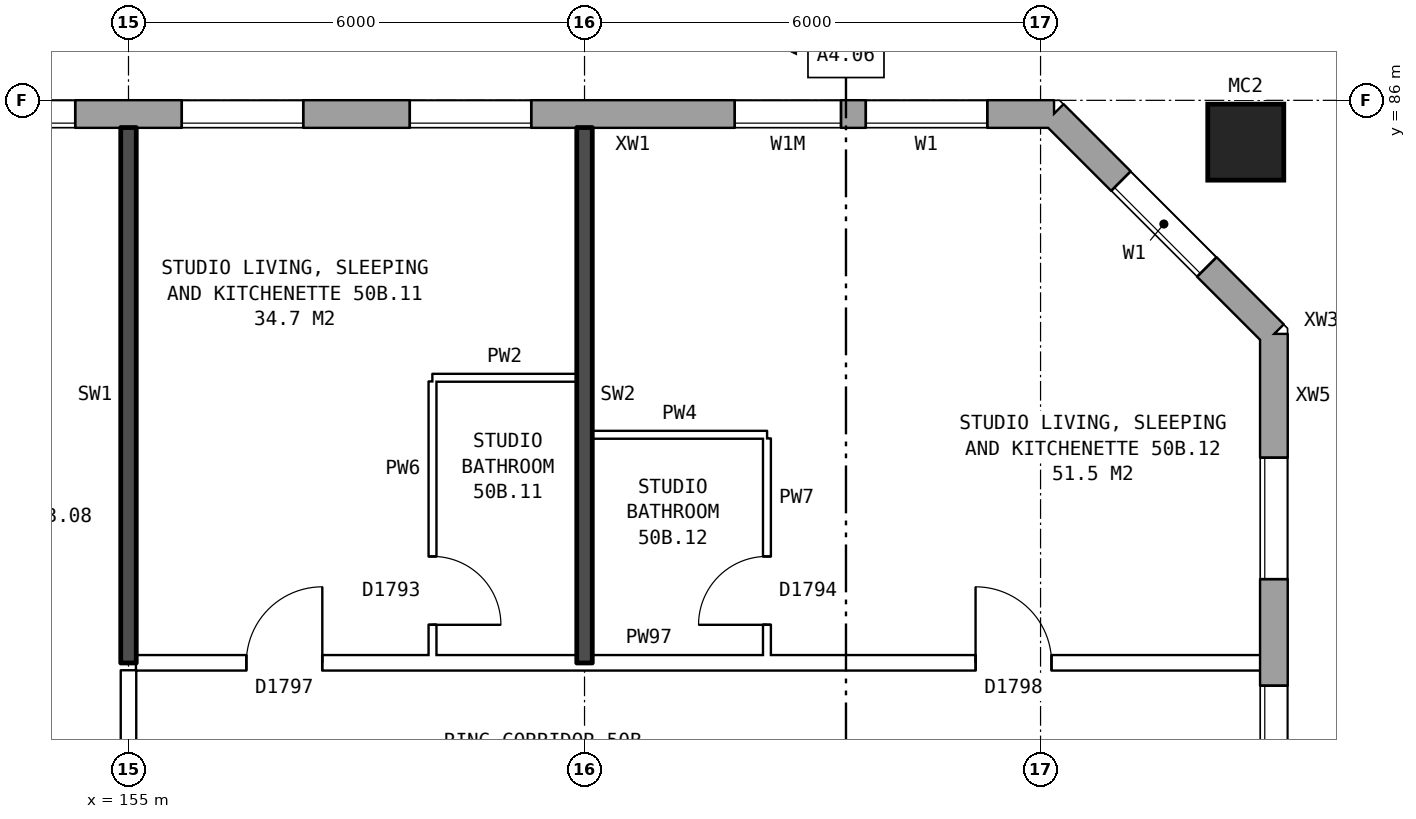
"""IFC4 building model, lengths in metres.
Left out: names, types, materials, properties, quantities, classifications, styles, units other than length and angle.
Written with IfcOpenShell. Run it as: python <this file> out.ifc"""

import sys

from ifc_helpers import new_model, si_unit, direction, frame, frame_2d, origin, origin_2d, place, context, subcontext, project, spatial, rectangle, hollow_rectangle, extrude, element, fill, save


model = new_model("IFC4")
c1 = context("Model", 3, precision=1e-05, world=origin(), true_north=direction((0.0, 1.0)))
c2 = subcontext(c1, "Body", "Model", "MODEL_VIEW")
j1 = project(units=[si_unit("LENGTHUNIT", "METRE"), si_unit("PLANEANGLEUNIT", "RADIAN")], contexts=[c1])
p1 = place(None, origin())
s1 = spatial("IfcSite", under=j1, at=p1, CompositionType="ELEMENT")
p2 = place(p1, origin())
s2 = spatial("IfcBuilding", under=s1, at=p2, CompositionType="ELEMENT")
p3 = place(p2, frame((0.0, 0.0, 178.9)))
s3 = spatial("IfcBuildingStorey", under=s2, at=p3, CompositionType="ELEMENT", Elevation=178.9)
p4 = place(p3, frame((169.7, 85.45, 0.0), z_axis=(0.0, 0.0, 1.0), x_axis=(1.0, 0.0, 0.0)))
e1 = element("IfcColumn", 1, at=p4, inside=s3, PredefinedType="COLUMN", context=c2, shape_type="SweptSolid", body=[
    extrude(hollow_rectangle(XDim=1.0, YDim=1.0, WallThickness=0.055, at=origin_2d()), origin(), (0.0, 0.0, 1.0), 3.1),
])
p5 = place(p3, frame((170.07, 57.075, 0.0), z_axis=(0.0, 0.0, 1.0), x_axis=(0.0, 1.0, 0.0)))
e2 = element("IfcWall", 2, at=p5, inside=s3, PredefinedType="STANDARD", context=c2, shape_type="SweptSolid", body=[
    extrude(rectangle(XDim=25.851, YDim=0.36, at=frame_2d((12.925, 0.0))), origin(), (0.0, 0.0, 1.0), 2.85),
])
p6 = place(p5, frame((1.625, 0.0, 0.8)))
e3 = element("IfcOpeningElement", 3, at=p6, cuts=e2, PredefinedType="OPENING", context=c2, shape_type="SweptSolid", body=[
    extrude(rectangle(XDim=1.6, YDim=1.8, at=frame_2d((0.8, 0.9))), frame((0.0, 0.19, 0.0), z_axis=(0.0, -1.0, 0.0), x_axis=(1.0, 0.0, 0.0)), (0.0, 0.0, 1.0), 0.38),
])
p7 = place(p5, frame((4.625, 0.0, 0.8)))
e4 = element("IfcOpeningElement", 4, at=p7, cuts=e2, PredefinedType="OPENING", context=c2, shape_type="SweptSolid", body=[
    extrude(rectangle(XDim=1.6, YDim=1.8, at=frame_2d((0.8, 0.9))), frame((0.0, 0.19, 0.0), z_axis=(0.0, -1.0, 0.0), x_axis=(1.0, 0.0, 0.0)), (0.0, 0.0, 1.0), 0.38),
])
p8 = place(p5, frame((6.525, 0.0, 0.8)))
e5 = element("IfcOpeningElement", 5, at=p8, cuts=e2, PredefinedType="OPENING", context=c2, shape_type="SweptSolid", body=[
    extrude(rectangle(XDim=1.4, YDim=1.8, at=frame_2d((0.7, 0.9))), frame((0.0, 0.19, 0.0), z_axis=(0.0, -1.0, 0.0), x_axis=(1.0, 0.0, 0.0)), (0.0, 0.0, 1.0), 0.38),
])
p9 = place(p5, frame((8.225, 0.0, 1.6)))
e6 = element("IfcOpeningElement", 6, at=p9, cuts=e2, PredefinedType="OPENING", context=c2, shape_type="SweptSolid", body=[
    extrude(rectangle(XDim=0.8, YDim=0.9, at=frame_2d((0.4, 0.45))), frame((0.0, 0.19, 0.0), z_axis=(0.0, -1.0, 0.0), x_axis=(1.0, 0.0, 0.0)), (0.0, 0.0, 1.0), 0.38),
])
p10 = place(p5, frame((10.075, 0.0, 0.8)))
e7 = element("IfcOpeningElement", 7, at=p10, cuts=e2, PredefinedType="OPENING", context=c2, shape_type="SweptSolid", body=[
    extrude(rectangle(XDim=1.0, YDim=0.9, at=frame_2d((0.5, 0.45))), frame((0.0, 0.19, 0.0), z_axis=(0.0, -1.0, 0.0), x_axis=(1.0, 0.0, 0.0)), (0.0, 0.0, 1.0), 0.38),
])
p11 = place(p5, frame((11.375, 0.0, 0.8)))
e8 = element("IfcOpeningElement", 8, at=p11, cuts=e2, PredefinedType="OPENING", context=c2, shape_type="SweptSolid", body=[
    extrude(rectangle(XDim=1.2, YDim=1.8, at=frame_2d((0.6, 0.9))), frame((0.0, 0.19, 0.0), z_axis=(0.0, -1.0, 0.0), x_axis=(1.0, 0.0, 0.0)), (0.0, 0.0, 1.0), 0.38),
])
p12 = place(p5, frame((19.625, 0.0, 0.8)))
e9 = element("IfcOpeningElement", 9, at=p12, cuts=e2, PredefinedType="OPENING", context=c2, shape_type="SweptSolid", body=[
    extrude(rectangle(XDim=1.6, YDim=1.8, at=frame_2d((0.8, 0.9))), frame((0.0, 0.19, 0.0), z_axis=(0.0, -1.0, 0.0), x_axis=(1.0, 0.0, 0.0)), (0.0, 0.0, 1.0), 0.38),
])
p13 = place(p5, frame((22.625, 0.0, 0.8)))
e10 = element("IfcOpeningElement", 10, at=p13, cuts=e2, PredefinedType="OPENING", context=c2, shape_type="SweptSolid", body=[
    extrude(rectangle(XDim=1.6, YDim=1.8, at=frame_2d((0.8, 0.9))), frame((0.0, 0.19, 0.0), z_axis=(0.0, -1.0, 0.0), x_axis=(1.0, 0.0, 0.0)), (0.0, 0.0, 1.0), 0.38),
])
p14 = place(p5, frame((12.875, 0.0, 0.8)))
e11 = element("IfcOpeningElement", 11, at=p14, cuts=e2, PredefinedType="OPENING", context=c2, shape_type="SweptSolid", body=[
    extrude(rectangle(XDim=1.6, YDim=1.8, at=frame_2d((0.8, 0.9))), frame((0.0, 0.19, 0.0), z_axis=(0.0, -1.0, 0.0), x_axis=(1.0, 0.0, 0.0)), (0.0, 0.0, 1.0), 0.38),
])
p15 = place(p5, frame((14.775, 0.0, 0.8)))
e12 = element("IfcOpeningElement", 12, at=p15, cuts=e2, PredefinedType="OPENING", context=c2, shape_type="SweptSolid", body=[
    extrude(rectangle(XDim=1.0, YDim=0.9, at=frame_2d((0.5, 0.45))), frame((0.0, 0.19, 0.0), z_axis=(0.0, -1.0, 0.0), x_axis=(1.0, 0.0, 0.0)), (0.0, 0.0, 1.0), 0.38),
])
p16 = place(p5, frame((16.675, 0.0, 1.7)))
e13 = element("IfcOpeningElement", 13, at=p16, cuts=e2, PredefinedType="OPENING", context=c2, shape_type="SweptSolid", body=[
    extrude(rectangle(XDim=0.8, YDim=0.9, at=frame_2d((0.4, 0.45))), frame((0.0, 0.19, 0.0), z_axis=(0.0, -1.0, 0.0), x_axis=(1.0, 0.0, 0.0)), (0.0, 0.0, 1.0), 0.38),
])
p17 = place(p5, frame((17.925, 0.0, 0.8)))
e14 = element("IfcOpeningElement", 14, at=p17, cuts=e2, PredefinedType="OPENING", context=c2, shape_type="SweptSolid", body=[
    extrude(rectangle(XDim=1.4, YDim=1.8, at=frame_2d((0.7, 0.9))), frame((0.0, 0.19, 0.0), z_axis=(0.0, -1.0, 0.0), x_axis=(1.0, 0.0, 0.0)), (0.0, 0.0, 1.0), 0.38),
])
p18 = place(p3, frame((170.07, 82.925, 0.0), z_axis=(0.0, 0.0, 1.0), x_axis=(-0.707106781187, 0.707106781187, 0.0)))
e15 = element("IfcWall", 15, at=p18, inside=s3, PredefinedType="STANDARD", context=c2, shape_type="SweptSolid", body=[
    extrude(rectangle(XDim=4.094, YDim=0.36, at=frame_2d((2.047, 0.0))), origin(), (0.0, 0.0, 1.0), 2.85),
])
p19 = place(p18, frame((1.247, 0.0, 0.8)))
e16 = element("IfcOpeningElement", 16, at=p19, cuts=e15, PredefinedType="OPENING", context=c2, shape_type="SweptSolid", body=[
    extrude(rectangle(XDim=1.6, YDim=1.8, at=frame_2d((0.8, 0.9))), frame((0.0, 0.19, 0.0), z_axis=(0.0, -1.0, 0.0), x_axis=(1.0, 0.0, 0.0)), (0.0, 0.0, 1.0), 0.38),
])
p20 = place(p3, frame((167.175, 85.82, 0.0), z_axis=(0.0, 0.0, 1.0), x_axis=(-1.0, 0.0, 0.0)))
e17 = element("IfcWall", 17, at=p20, inside=s3, PredefinedType="STANDARD", context=c2, shape_type="SweptSolid", body=[
    extrude(rectangle(XDim=33.101, YDim=0.36, at=frame_2d((16.55, 0.0))), origin(), (0.0, 0.0, 1.0), 2.85),
])
p21 = place(p20, frame((0.875, 0.0, 0.8)))
e18 = element("IfcOpeningElement", 18, at=p21, cuts=e17, PredefinedType="OPENING", context=c2, shape_type="SweptSolid", body=[
    extrude(rectangle(XDim=1.6, YDim=1.8, at=frame_2d((0.8, 0.9))), frame((0.0, 0.19, 0.0), z_axis=(0.0, -1.0, 0.0), x_axis=(1.0, 0.0, 0.0)), (0.0, 0.0, 1.0), 0.38),
])
p22 = place(p20, frame((2.8, 0.0, 1.4)))
e19 = element("IfcOpeningElement", 19, at=p22, cuts=e17, PredefinedType="OPENING", context=c2, shape_type="SweptSolid", body=[
    extrude(rectangle(XDim=1.4, YDim=1.2, at=frame_2d((0.7, 0.6))), frame((0.0, 0.19, 0.0), z_axis=(0.0, -1.0, 0.0), x_axis=(1.0, 0.0, 0.0)), (0.0, 0.0, 1.0), 0.38),
])
p23 = place(p20, frame((6.875, 0.0, 0.8)))
e20 = element("IfcOpeningElement", 20, at=p23, cuts=e17, PredefinedType="OPENING", context=c2, shape_type="SweptSolid", body=[
    extrude(rectangle(XDim=1.6, YDim=1.8, at=frame_2d((0.8, 0.9))), frame((0.0, 0.19, 0.0), z_axis=(0.0, -1.0, 0.0), x_axis=(1.0, 0.0, 0.0)), (0.0, 0.0, 1.0), 0.38),
])
p24 = place(p20, frame((9.875, 0.0, 0.8)))
e21 = element("IfcOpeningElement", 21, at=p24, cuts=e17, PredefinedType="OPENING", context=c2, shape_type="SweptSolid", body=[
    extrude(rectangle(XDim=1.6, YDim=1.8, at=frame_2d((0.8, 0.9))), frame((0.0, 0.19, 0.0), z_axis=(0.0, -1.0, 0.0), x_axis=(1.0, 0.0, 0.0)), (0.0, 0.0, 1.0), 0.38),
])
p25 = place(p20, frame((12.875, 0.0, 0.8)))
e22 = element("IfcOpeningElement", 22, at=p25, cuts=e17, PredefinedType="OPENING", context=c2, shape_type="SweptSolid", body=[
    extrude(rectangle(XDim=1.6, YDim=1.8, at=frame_2d((0.8, 0.9))), frame((0.0, 0.19, 0.0), z_axis=(0.0, -1.0, 0.0), x_axis=(1.0, 0.0, 0.0)), (0.0, 0.0, 1.0), 0.38),
])
p26 = place(p20, frame((15.875, 0.0, 0.8)))
e23 = element("IfcOpeningElement", 23, at=p26, cuts=e17, PredefinedType="OPENING", context=c2, shape_type="SweptSolid", body=[
    extrude(rectangle(XDim=1.6, YDim=1.8, at=frame_2d((0.8, 0.9))), frame((0.0, 0.19, 0.0), z_axis=(0.0, -1.0, 0.0), x_axis=(1.0, 0.0, 0.0)), (0.0, 0.0, 1.0), 0.38),
])
p27 = place(p20, frame((18.875, 0.0, 0.8)))
e24 = element("IfcOpeningElement", 24, at=p27, cuts=e17, PredefinedType="OPENING", context=c2, shape_type="SweptSolid", body=[
    extrude(rectangle(XDim=1.6, YDim=1.8, at=frame_2d((0.8, 0.9))), frame((0.0, 0.19, 0.0), z_axis=(0.0, -1.0, 0.0), x_axis=(1.0, 0.0, 0.0)), (0.0, 0.0, 1.0), 0.38),
])
p28 = place(p20, frame((21.875, 0.0, 0.8)))
e25 = element("IfcOpeningElement", 25, at=p28, cuts=e17, PredefinedType="OPENING", context=c2, shape_type="SweptSolid", body=[
    extrude(rectangle(XDim=1.6, YDim=1.8, at=frame_2d((0.8, 0.9))), frame((0.0, 0.19, 0.0), z_axis=(0.0, -1.0, 0.0), x_axis=(1.0, 0.0, 0.0)), (0.0, 0.0, 1.0), 0.38),
])
p29 = place(p20, frame((24.875, 0.0, 0.8)))
e26 = element("IfcOpeningElement", 26, at=p29, cuts=e17, PredefinedType="OPENING", context=c2, shape_type="SweptSolid", body=[
    extrude(rectangle(XDim=1.6, YDim=1.8, at=frame_2d((0.8, 0.9))), frame((0.0, 0.19, 0.0), z_axis=(0.0, -1.0, 0.0), x_axis=(1.0, 0.0, 0.0)), (0.0, 0.0, 1.0), 0.38),
])
p30 = place(p20, frame((26.775, 0.0, 0.8)))
e27 = element("IfcOpeningElement", 27, at=p30, cuts=e17, PredefinedType="OPENING", context=c2, shape_type="SweptSolid", body=[
    extrude(rectangle(XDim=0.8, YDim=0.9, at=frame_2d((0.4, 0.45))), frame((0.0, 0.19, 0.0), z_axis=(0.0, -1.0, 0.0), x_axis=(1.0, 0.0, 0.0)), (0.0, 0.0, 1.0), 0.38),
])
p31 = place(p20, frame((30.875, 0.0, 0.8)))
e28 = element("IfcOpeningElement", 28, at=p31, cuts=e17, PredefinedType="OPENING", context=c2, shape_type="SweptSolid", body=[
    extrude(rectangle(XDim=1.6, YDim=1.8, at=frame_2d((0.8, 0.9))), frame((0.0, 0.19, 0.0), z_axis=(0.0, -1.0, 0.0), x_axis=(1.0, 0.0, 0.0)), (0.0, 0.0, 1.0), 0.38),
])
p32 = place(p20, frame((28.925, 0.0, 1.4)))
e29 = element("IfcOpeningElement", 29, at=p32, cuts=e17, PredefinedType="OPENING", context=c2, shape_type="SweptSolid", body=[
    extrude(rectangle(XDim=1.0, YDim=1.2, at=frame_2d((0.5, 0.6))), frame((0.0, 0.19, 0.0), z_axis=(0.0, -1.0, 0.0), x_axis=(1.0, 0.0, 0.0)), (0.0, 0.0, 1.0), 0.38),
])
p33 = place(p3, frame((155.1, 78.6, 0.0), z_axis=(0.0, 0.0, 1.0), x_axis=(1.0, 0.0, 0.0)))
e30 = element("IfcWall", 30, at=p33, inside=s3, PredefinedType="PARTITIONING", context=c2, shape_type="SweptSolid", body=[
    extrude(rectangle(XDim=14.79, YDim=0.2, at=frame_2d((7.395, 0.0))), origin(), (0.0, 0.0, 1.0), 2.85),
])
p34 = place(p33, frame((1.45, 0.0, 0.0)))
e31 = element("IfcOpeningElement", 31, at=p34, cuts=e30, PredefinedType="OPENING", context=c2, shape_type="SweptSolid", body=[
    extrude(rectangle(XDim=1.0, YDim=2.1, at=frame_2d((0.5, 1.05))), frame((0.0, 0.11, 0.0), z_axis=(0.0, -1.0, 0.0), x_axis=(1.0, 0.0, 0.0)), (0.0, 0.0, 1.0), 0.22),
])
p35 = place(p33, frame((11.045, 0.0, 0.0)))
e32 = element("IfcOpeningElement", 32, at=p35, cuts=e30, PredefinedType="OPENING", context=c2, shape_type="SweptSolid", body=[
    extrude(rectangle(XDim=1.0, YDim=2.1, at=frame_2d((0.5, 1.05))), frame((0.0, 0.11, 0.0), z_axis=(0.0, -1.0, 0.0), x_axis=(1.0, 0.0, 0.0)), (0.0, 0.0, 1.0), 0.22),
])
p36 = place(p3, frame((161.1, 81.6, 0.0), z_axis=(0.0, 0.0, 1.0), x_axis=(1.0, 0.0, 0.0)))
e33 = element("IfcWall", 33, at=p36, inside=s3, PredefinedType="PARTITIONING", context=c2, shape_type="SweptSolid", body=[
    extrude(rectangle(XDim=2.3, YDim=0.1, at=frame_2d((1.15, 0.0))), origin(), (0.0, 0.0, 1.0), 2.85),
])
p37 = place(p3, frame((159.0, 82.35, 0.0), z_axis=(0.0, 0.0, 1.0), x_axis=(1.0, 0.0, 0.0)))
e34 = element("IfcWall", 34, at=p37, inside=s3, PredefinedType="PARTITIONING", context=c2, shape_type="SweptSolid", body=[
    extrude(rectangle(XDim=1.9, YDim=0.1, at=frame_2d((0.95, 0.0))), origin(), (0.0, 0.0, 1.0), 2.85),
])
p38 = place(p3, frame((155.0, 76.3, 0.0), z_axis=(0.0, 0.0, 1.0), x_axis=(0.0, 1.0, 0.0)))
e35 = element("IfcWall", 35, at=p38, inside=s3, PredefinedType="PARTITIONING", context=c2, shape_type="SweptSolid", body=[
    extrude(rectangle(XDim=2.2, YDim=0.2, at=frame_2d((1.1, 0.0))), origin(), (0.0, 0.0, 1.0), 2.85),
])
p39 = place(p3, frame((155.0, 78.6, 0.0), z_axis=(0.0, 0.0, 1.0), x_axis=(0.0, 1.0, 0.0)))
e36 = element("IfcWall", 36, at=p39, inside=s3, PredefinedType="SOLIDWALL", context=c2, shape_type="SweptSolid", body=[
    extrude(rectangle(XDim=7.04, YDim=0.2, at=frame_2d((3.52, 0.0))), origin(), (0.0, 0.0, 1.0), 2.85),
])
p40 = place(p3, frame((159.0, 78.7, 0.0), z_axis=(0.0, 0.0, 1.0), x_axis=(0.0, 1.0, 0.0)))
e37 = element("IfcWall", 37, at=p40, inside=s3, PredefinedType="PARTITIONING", context=c2, shape_type="SweptSolid", body=[
    extrude(rectangle(XDim=3.6, YDim=0.1, at=frame_2d((1.8, 0.0))), origin(), (0.0, 0.0, 1.0), 2.85),
])
p41 = place(p40, frame((0.4, 0.0, 0.0)))
e38 = element("IfcOpeningElement", 38, at=p41, cuts=e37, PredefinedType="OPENING", context=c2, shape_type="SweptSolid", body=[
    extrude(rectangle(XDim=0.9, YDim=2.1, at=frame_2d((0.45, 1.05))), frame((0.0, 0.06, 0.0), z_axis=(0.0, -1.0, 0.0), x_axis=(1.0, 0.0, 0.0)), (0.0, 0.0, 1.0), 0.12),
])
p42 = place(p3, frame((161.0, 78.6, 0.0), z_axis=(0.0, 0.0, 1.0), x_axis=(0.0, 1.0, 0.0)))
e39 = element("IfcWall", 39, at=p42, inside=s3, PredefinedType="SOLIDWALL", context=c2, shape_type="SweptSolid", body=[
    extrude(rectangle(XDim=7.04, YDim=0.2, at=frame_2d((3.52, 0.0))), origin(), (0.0, 0.0, 1.0), 2.85),
])
p43 = place(p3, frame((163.4, 78.7, 0.0), z_axis=(0.0, 0.0, 1.0), x_axis=(0.0, 1.0, 0.0)))
e40 = element("IfcWall", 40, at=p43, inside=s3, PredefinedType="PARTITIONING", context=c2, shape_type="SweptSolid", body=[
    extrude(rectangle(XDim=2.85, YDim=0.1, at=frame_2d((1.425, 0.0))), origin(), (0.0, 0.0, 1.0), 2.85),
])
p44 = place(p43, frame((0.4, 0.0, 0.0)))
e41 = element("IfcOpeningElement", 41, at=p44, cuts=e40, PredefinedType="OPENING", context=c2, shape_type="SweptSolid", body=[
    extrude(rectangle(XDim=0.9, YDim=2.1, at=frame_2d((0.45, 1.05))), frame((0.0, 0.06, 0.0), z_axis=(0.0, -1.0, 0.0), x_axis=(1.0, 0.0, 0.0)), (0.0, 0.0, 1.0), 0.12),
])
p45 = place(p12, origin())
e42 = element("IfcWindow", 42, at=p45, inside=s3, PartitioningType="SINGLE_PANEL", PredefinedType="WINDOW", context=c2, shape_type="SweptSolid", body=[
    extrude(rectangle(XDim=1.6, YDim=1.8, at=frame_2d((0.8, 0.9))), frame((0.0, 0.15, 0.0), z_axis=(0.0, -1.0, 0.0), x_axis=(1.0, 0.0, 0.0)), (0.0, 0.0, 1.0), 0.06),
])
fill(e9, e42)
p46 = place(p13, origin())
e43 = element("IfcWindow", 43, at=p46, inside=s3, PartitioningType="SINGLE_PANEL", PredefinedType="WINDOW", context=c2, shape_type="SweptSolid", body=[
    extrude(rectangle(XDim=1.6, YDim=1.8, at=frame_2d((0.8, 0.9))), frame((0.0, 0.15, 0.0), z_axis=(0.0, -1.0, 0.0), x_axis=(1.0, 0.0, 0.0)), (0.0, 0.0, 1.0), 0.06),
])
fill(e10, e43)
p47 = place(p19, origin())
e44 = element("IfcWindow", 44, at=p47, inside=s3, PartitioningType="SINGLE_PANEL", PredefinedType="WINDOW", context=c2, shape_type="SweptSolid", body=[
    extrude(rectangle(XDim=1.6, YDim=1.8, at=frame_2d((0.8, 0.9))), frame((0.0, 0.15, 0.0), z_axis=(0.0, -1.0, 0.0), x_axis=(1.0, 0.0, 0.0)), (0.0, 0.0, 1.0), 0.06),
])
fill(e16, e44)
p48 = place(p21, origin())
e45 = element("IfcWindow", 45, at=p48, inside=s3, PartitioningType="SINGLE_PANEL", PredefinedType="WINDOW", context=c2, shape_type="SweptSolid", body=[
    extrude(rectangle(XDim=1.6, YDim=1.8, at=frame_2d((0.8, 0.9))), frame((0.0, 0.15, 0.0), z_axis=(0.0, -1.0, 0.0), x_axis=(1.0, 0.0, 0.0)), (0.0, 0.0, 1.0), 0.06),
])
fill(e18, e45)
p49 = place(p22, origin())
e46 = element("IfcWindow", 46, at=p49, inside=s3, PartitioningType="SINGLE_PANEL", PredefinedType="WINDOW", context=c2, shape_type="SweptSolid", body=[
    extrude(rectangle(XDim=1.4, YDim=1.2, at=frame_2d((0.7, 0.6))), frame((0.0, 0.15, 0.0), z_axis=(0.0, -1.0, 0.0), x_axis=(1.0, 0.0, 0.0)), (0.0, 0.0, 1.0), 0.06),
])
fill(e19, e46)
p50 = place(p23, origin())
e47 = element("IfcWindow", 47, at=p50, inside=s3, PartitioningType="SINGLE_PANEL", PredefinedType="WINDOW", context=c2, shape_type="SweptSolid", body=[
    extrude(rectangle(XDim=1.6, YDim=1.8, at=frame_2d((0.8, 0.9))), frame((0.0, 0.15, 0.0), z_axis=(0.0, -1.0, 0.0), x_axis=(1.0, 0.0, 0.0)), (0.0, 0.0, 1.0), 0.06),
])
fill(e20, e47)
p51 = place(p24, origin())
e48 = element("IfcWindow", 48, at=p51, inside=s3, PartitioningType="SINGLE_PANEL", PredefinedType="WINDOW", context=c2, shape_type="SweptSolid", body=[
    extrude(rectangle(XDim=1.6, YDim=1.8, at=frame_2d((0.8, 0.9))), frame((0.0, 0.15, 0.0), z_axis=(0.0, -1.0, 0.0), x_axis=(1.0, 0.0, 0.0)), (0.0, 0.0, 1.0), 0.06),
])
fill(e21, e48)
p52 = place(p25, origin())
e49 = element("IfcWindow", 49, at=p52, inside=s3, PartitioningType="SINGLE_PANEL", PredefinedType="WINDOW", context=c2, shape_type="SweptSolid", body=[
    extrude(rectangle(XDim=1.6, YDim=1.8, at=frame_2d((0.8, 0.9))), frame((0.0, 0.15, 0.0), z_axis=(0.0, -1.0, 0.0), x_axis=(1.0, 0.0, 0.0)), (0.0, 0.0, 1.0), 0.06),
])
fill(e22, e49)
p53 = place(p34, origin())
e50 = element("IfcDoor", 50, at=p53, inside=s3, OperationType="SINGLE_SWING_RIGHT", PredefinedType="DOOR", context=c2, shape_type="SweptSolid", body=[
    extrude(rectangle(XDim=1.0, YDim=2.1, at=frame_2d((0.5, 1.05))), frame((0.0, 0.025, 0.0), z_axis=(0.0, -1.0, 0.0), x_axis=(1.0, 0.0, 0.0)), (0.0, 0.0, 1.0), 0.05),
])
fill(e31, e50)
p54 = place(p41, frame((0.9, 0.0, 0.0), z_axis=(0.0, 0.0, 1.0), x_axis=(-1.0, 0.0, 0.0)))
e51 = element("IfcDoor", 51, at=p54, inside=s3, OperationType="SINGLE_SWING_RIGHT", PredefinedType="DOOR", context=c2, shape_type="SweptSolid", body=[
    extrude(rectangle(XDim=0.9, YDim=2.1, at=frame_2d((0.45, 1.05))), frame((0.0, 0.025, 0.0), z_axis=(0.0, -1.0, 0.0), x_axis=(1.0, 0.0, 0.0)), (0.0, 0.0, 1.0), 0.05),
])
fill(e38, e51)
p55 = place(p35, origin())
e52 = element("IfcDoor", 52, at=p55, inside=s3, OperationType="SINGLE_SWING_LEFT", PredefinedType="DOOR", context=c2, shape_type="SweptSolid", body=[
    extrude(rectangle(XDim=1.0, YDim=2.1, at=frame_2d((0.5, 1.05))), frame((0.0, 0.025, 0.0), z_axis=(0.0, -1.0, 0.0), x_axis=(1.0, 0.0, 0.0)), (0.0, 0.0, 1.0), 0.05),
])
fill(e32, e52)
p56 = place(p44, origin())
e53 = element("IfcDoor", 53, at=p56, inside=s3, OperationType="SINGLE_SWING_LEFT", PredefinedType="DOOR", context=c2, shape_type="SweptSolid", body=[
    extrude(rectangle(XDim=0.9, YDim=2.1, at=frame_2d((0.45, 1.05))), frame((0.0, 0.025, 0.0), z_axis=(0.0, -1.0, 0.0), x_axis=(1.0, 0.0, 0.0)), (0.0, 0.0, 1.0), 0.05),
])
fill(e41, e53)
save(model, sys.argv[1])
